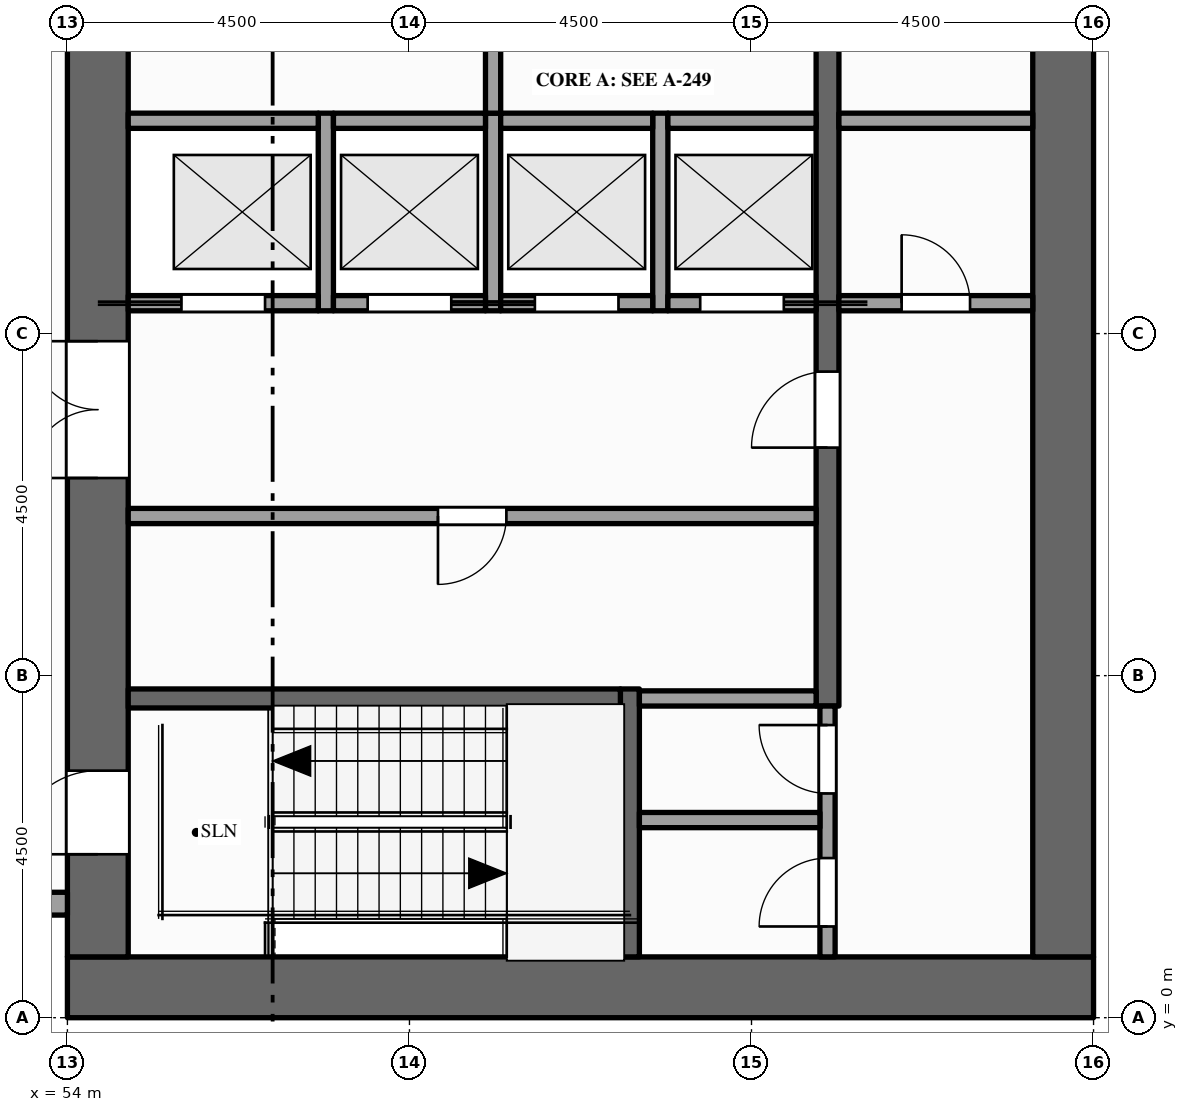
"""IFC4 building model, lengths in metres.
Left out: names, types, materials, properties, quantities, classifications, styles, units other than length and angle.
Written with IfcOpenShell. Run it as: python <this file> out.ifc"""

import sys

from ifc_helpers import new_model, si_unit, direction, frame, frame_2d, origin, place, context, subcontext, project, spatial, rectangle, extrude, element, fill, save


model = new_model("IFC4")
c1 = context("Model", 3, precision=1e-05, world=origin(), true_north=direction((0.0, 1.0)))
c2 = subcontext(c1, "Body", "Model", "MODEL_VIEW")
j1 = project(units=[si_unit("LENGTHUNIT", "METRE"), si_unit("PLANEANGLEUNIT", "RADIAN")], contexts=[c1])
p1 = place(None, origin())
s1 = spatial("IfcSite", under=j1, at=p1, CompositionType="ELEMENT")
p2 = place(p1, origin())
s2 = spatial("IfcBuilding", under=s1, at=p2, CompositionType="ELEMENT")
p3 = place(p2, frame((0.0, 0.0, 281.0)))
s3 = spatial("IfcBuildingStorey", under=s2, at=p3, CompositionType="ELEMENT", Elevation=281.0)
p4 = place(p3, frame((67.5, 0.4, -0.15), z_axis=(0.0, 0.0, 1.0), x_axis=(-1.0, 0.0, 0.0)))
e1 = element("IfcWall", 1, at=p4, inside=s3, PredefinedType="SHEAR", context=c2, shape_type="SweptSolid", body=[
    extrude(rectangle(XDim=13.5, YDim=0.8, at=frame_2d((6.75, 0.0))), origin(), (0.0, 0.0, 1.0), 4.0),
])
p5 = place(p3, frame((54.4, 0.8, -0.15), z_axis=(0.0, 0.0, 1.0), x_axis=(0.0, 1.0, 0.0)))
e2 = element("IfcWall", 2, at=p5, inside=s3, PredefinedType="SHEAR", context=c2, shape_type="SweptSolid", body=[
    extrude(rectangle(XDim=20.9, YDim=0.8, at=frame_2d((10.45, 0.0))), origin(), (0.0, 0.0, 1.0), 4.0),
])
p6 = place(p5, frame((6.3, 0.0, 0.15)))
e3 = element("IfcOpeningElement", 3, at=p6, cuts=e2, PredefinedType="OPENING", context=c2, shape_type="SweptSolid", body=[
    extrude(rectangle(XDim=1.8, YDim=2.1, at=frame_2d((0.9, 1.05))), frame((0.0, 0.41, 0.0), z_axis=(0.0, -1.0, 0.0), x_axis=(1.0, 0.0, 0.0)), (0.0, 0.0, 1.0), 0.82),
])
p7 = place(p5, frame((12.35, 0.0, 0.15)))
e4 = element("IfcOpeningElement", 4, at=p7, cuts=e2, PredefinedType="OPENING", context=c2, shape_type="SweptSolid", body=[
    extrude(rectangle(XDim=1.1, YDim=2.1, at=frame_2d((0.55, 1.05))), frame((0.0, 0.41, 0.0), z_axis=(0.0, -1.0, 0.0), x_axis=(1.0, 0.0, 0.0)), (0.0, 0.0, 1.0), 0.82),
])
p8 = place(p5, frame((1.35, 0.0, 0.15)))
e5 = element("IfcOpeningElement", 5, at=p8, cuts=e2, PredefinedType="OPENING", context=c2, shape_type="SweptSolid", body=[
    extrude(rectangle(XDim=1.1, YDim=2.1, at=frame_2d((0.55, 1.05))), frame((0.0, 0.41, 0.0), z_axis=(0.0, -1.0, 0.0), x_axis=(1.0, 0.0, 0.0)), (0.0, 0.0, 1.0), 0.82),
])
p9 = place(p5, frame((18.55, 0.0, 0.15)))
e6 = element("IfcOpeningElement", 6, at=p9, cuts=e2, PredefinedType="OPENING", context=c2, shape_type="SweptSolid", body=[
    extrude(rectangle(XDim=1.1, YDim=2.1, at=frame_2d((0.55, 1.05))), frame((0.0, 0.41, 0.0), z_axis=(0.0, -1.0, 0.0), x_axis=(1.0, 0.0, 0.0)), (0.0, 0.0, 1.0), 0.82),
])
p10 = place(p3, frame((67.1, 0.8, -0.15), z_axis=(0.0, 0.0, 1.0), x_axis=(0.0, 1.0, 0.0)))
e7 = element("IfcWall", 7, at=p10, inside=s3, PredefinedType="SHEAR", context=c2, shape_type="SweptSolid", body=[
    extrude(rectangle(XDim=20.9, YDim=0.8, at=frame_2d((10.45, 0.0))), origin(), (0.0, 0.0, 1.0), 4.0),
])
p11 = place(p3, frame((49.825, 1.5, 0.0), z_axis=(0.0, 0.0, 1.0), x_axis=(1.0, 0.0, 0.0)))
e8 = element("IfcWall", 8, at=p11, inside=s3, PredefinedType="STANDARD", context=c2, shape_type="SweptSolid", body=[
    extrude(rectangle(XDim=4.175, YDim=0.3, at=frame_2d((2.087, 0.0))), origin(), (0.0, 0.0, 1.0), 2.87),
])
p12 = place(p11, frame((0.413, 0.0, 0.9)))
e9 = element("IfcOpeningElement", 9, at=p12, cuts=e8, PredefinedType="OPENING", context=c2, shape_type="SweptSolid", body=[
    extrude(rectangle(XDim=1.2, YDim=1.75, at=frame_2d((0.6, 0.875))), frame((0.0, 0.16, 0.0), z_axis=(0.0, -1.0, 0.0), x_axis=(1.0, 0.0, 0.0)), (0.0, 0.0, 1.0), 0.32),
])
p13 = place(p11, frame((2.225, 0.0, 0.9)))
e10 = element("IfcOpeningElement", 10, at=p13, cuts=e8, PredefinedType="OPENING", context=c2, shape_type="SweptSolid", body=[
    extrude(rectangle(XDim=1.55, YDim=1.75, at=frame_2d((0.775, 0.875))), frame((0.0, 0.16, 0.0), z_axis=(0.0, -1.0, 0.0), x_axis=(1.0, 0.0, 0.0)), (0.0, 0.0, 1.0), 0.32),
])
for number, where, z_axis, x_axis in (
    (11, (57.4, 9.3, 0.0), (0.0, 0.0, 1.0), (0.0, 1.0, 0.0)),
    (12, (59.6, 9.3, 0.0), (0.0, 0.0, 1.0), (0.0, 1.0, 0.0)),
):
    element("IfcWall", number, at=place(p3, frame(where, z_axis=z_axis, x_axis=x_axis)), inside=s3, PredefinedType="SOLIDWALL", context=c2, shape_type="SweptSolid", body=[
        extrude(rectangle(XDim=2.6, YDim=0.2, at=frame_2d((1.3, 0.0))), origin(), (0.0, 0.0, 1.0), 3.85),
    ])
p14 = place(p3, frame((59.6, 11.9, 0.0), z_axis=(0.0, 0.0, 1.0), x_axis=(0.0, 1.0, 0.0)))
e13 = element("IfcWall", 13, at=p14, inside=s3, PredefinedType="PARTITIONING", context=c2, shape_type="SweptSolid", body=[
    extrude(rectangle(XDim=3.6, YDim=0.2, at=frame_2d((1.8, 0.0))), origin(), (0.0, 0.0, 1.0), 3.85),
])
p15 = place(p14, frame((1.3, 0.0, 0.0)))
e14 = element("IfcOpeningElement", 14, at=p15, cuts=e13, PredefinedType="OPENING", context=c2, shape_type="SweptSolid", body=[
    extrude(rectangle(XDim=1.0, YDim=2.1, at=frame_2d((0.5, 1.05))), frame((0.0, 0.11, 0.0), z_axis=(0.0, -1.0, 0.0), x_axis=(1.0, 0.0, 0.0)), (0.0, 0.0, 1.0), 0.22),
])
p16 = place(p3, frame((61.4, 0.8, 0.0), z_axis=(0.0, 0.0, 1.0), x_axis=(0.0, 1.0, 0.0)))
e15 = element("IfcWall", 15, at=p16, inside=s3, PredefinedType="SHEAR", context=c2, shape_type="SweptSolid", body=[
    extrude(rectangle(XDim=3.525, YDim=0.25, at=frame_2d((1.762, 0.0))), origin(), (0.0, 0.0, 1.0), 3.85),
])
p17 = place(p3, frame((61.8, 9.3, 0.0), z_axis=(0.0, 0.0, 1.0), x_axis=(0.0, 1.0, 0.0)))
e16 = element("IfcWall", 16, at=p17, inside=s3, PredefinedType="SOLIDWALL", context=c2, shape_type="SweptSolid", body=[
    extrude(rectangle(XDim=2.6, YDim=0.2, at=frame_2d((1.3, 0.0))), origin(), (0.0, 0.0, 1.0), 3.85),
])
p18 = place(p3, frame((64.0, 0.8, 0.0), z_axis=(0.0, 0.0, 1.0), x_axis=(0.0, 1.0, 0.0)))
e17 = element("IfcWall", 17, at=p18, inside=s3, PredefinedType="PARTITIONING", context=c2, shape_type="SweptSolid", body=[
    extrude(rectangle(XDim=3.3, YDim=0.2, at=frame_2d((1.65, 0.0))), origin(), (0.0, 0.0, 1.0), 3.85),
])
p19 = place(p18, frame((0.4, 0.0, 0.0)))
e18 = element("IfcOpeningElement", 18, at=p19, cuts=e17, PredefinedType="OPENING", context=c2, shape_type="SweptSolid", body=[
    extrude(rectangle(XDim=0.9, YDim=2.1, at=frame_2d((0.45, 1.05))), frame((0.0, 0.11, 0.0), z_axis=(0.0, -1.0, 0.0), x_axis=(1.0, 0.0, 0.0)), (0.0, 0.0, 1.0), 0.22),
])
p20 = place(p18, frame((2.15, 0.0, 0.0)))
e19 = element("IfcOpeningElement", 19, at=p20, cuts=e17, PredefinedType="OPENING", context=c2, shape_type="SweptSolid", body=[
    extrude(rectangle(XDim=0.9, YDim=2.1, at=frame_2d((0.45, 1.05))), frame((0.0, 0.11, 0.0), z_axis=(0.0, -1.0, 0.0), x_axis=(1.0, 0.0, 0.0)), (0.0, 0.0, 1.0), 0.22),
])
p21 = place(p3, frame((64.0, 4.1, 0.0), z_axis=(0.0, 0.0, 1.0), x_axis=(0.0, 1.0, 0.0)))
e20 = element("IfcWall", 20, at=p21, inside=s3, PredefinedType="SHEAR", context=c2, shape_type="SweptSolid", body=[
    extrude(rectangle(XDim=14.5, YDim=0.3, at=frame_2d((7.25, 0.0))), origin(), (0.0, 0.0, 1.0), 3.85),
])
p22 = place(p21, frame((3.4, 0.0, 0.0)))
e21 = element("IfcOpeningElement", 21, at=p22, cuts=e20, PredefinedType="OPENING", context=c2, shape_type="SweptSolid", body=[
    extrude(rectangle(XDim=1.0, YDim=2.1, at=frame_2d((0.5, 1.05))), frame((0.0, 0.16, 0.0), z_axis=(0.0, -1.0, 0.0), x_axis=(1.0, 0.0, 0.0)), (0.0, 0.0, 1.0), 0.32),
])
p23 = place(p21, frame((9.1, 0.0, 0.0)))
e22 = element("IfcOpeningElement", 22, at=p23, cuts=e20, PredefinedType="OPENING", context=c2, shape_type="SweptSolid", body=[
    extrude(rectangle(XDim=1.0, YDim=2.1, at=frame_2d((0.5, 1.05))), frame((0.0, 0.16, 0.0), z_axis=(0.0, -1.0, 0.0), x_axis=(1.0, 0.0, 0.0)), (0.0, 0.0, 1.0), 0.32),
])
p24 = place(p3, frame((61.525, 2.6, 0.0), z_axis=(0.0, 0.0, 1.0), x_axis=(1.0, 0.0, 0.0)))
e23 = element("IfcWall", 23, at=p24, inside=s3, PredefinedType="PARTITIONING", context=c2, shape_type="SweptSolid", body=[
    extrude(rectangle(XDim=2.375, YDim=0.2, at=frame_2d((1.188, 0.0))), origin(), (0.0, 0.0, 1.0), 3.85),
])
p25 = place(p3, frame((54.8, 4.2, 0.0), z_axis=(0.0, 0.0, 1.0), x_axis=(1.0, 0.0, 0.0)))
e24 = element("IfcWall", 24, at=p25, inside=s3, PredefinedType="SHEAR", context=c2, shape_type="SweptSolid", body=[
    extrude(rectangle(XDim=6.475, YDim=0.25, at=frame_2d((3.237, 0.0))), origin(), (0.0, 0.0, 1.0), 3.85),
])
p26 = place(p3, frame((61.525, 4.2, 0.0), z_axis=(0.0, 0.0, 1.0), x_axis=(1.0, 0.0, 0.0)))
e25 = element("IfcWall", 25, at=p26, inside=s3, PredefinedType="PARTITIONING", context=c2, shape_type="SweptSolid", body=[
    extrude(rectangle(XDim=2.325, YDim=0.2, at=frame_2d((1.163, 0.0))), origin(), (0.0, 0.0, 1.0), 3.85),
])
p27 = place(p3, frame((54.8, 6.6, 0.0), z_axis=(0.0, 0.0, 1.0), x_axis=(1.0, 0.0, 0.0)))
e26 = element("IfcWall", 26, at=p27, inside=s3, PredefinedType="PARTITIONING", context=c2, shape_type="SweptSolid", body=[
    extrude(rectangle(XDim=9.05, YDim=0.2, at=frame_2d((4.525, 0.0))), origin(), (0.0, 0.0, 1.0), 3.85),
])
p28 = place(p27, frame((4.075, 0.0, 0.0)))
e27 = element("IfcOpeningElement", 27, at=p28, cuts=e26, PredefinedType="OPENING", context=c2, shape_type="SweptSolid", body=[
    extrude(rectangle(XDim=0.9, YDim=2.1, at=frame_2d((0.45, 1.05))), frame((0.0, 0.11, 0.0), z_axis=(0.0, -1.0, 0.0), x_axis=(1.0, 0.0, 0.0)), (0.0, 0.0, 1.0), 0.22),
])
p29 = place(p3, frame((54.8, 9.4, 0.0), z_axis=(0.0, 0.0, 1.0), x_axis=(1.0, 0.0, 0.0)))
e28 = element("IfcWall", 28, at=p29, inside=s3, PredefinedType="SOLIDWALL", context=c2, shape_type="SweptSolid", body=[
    extrude(rectangle(XDim=2.5, YDim=0.2, at=frame_2d((1.25, 0.0))), origin(), (0.0, 0.0, 1.0), 3.85),
])
p30 = place(p29, frame((0.7, 0.0, 0.012)))
e29 = element("IfcOpeningElement", 29, at=p30, cuts=e28, PredefinedType="OPENING", context=c2, shape_type="SweptSolid", body=[
    extrude(rectangle(XDim=1.1, YDim=2.1, at=frame_2d((0.55, 1.05))), frame((0.0, 0.11, 0.0), z_axis=(0.0, -1.0, 0.0), x_axis=(1.0, 0.0, 0.0)), (0.0, 0.0, 1.0), 0.22),
])
p31 = place(p3, frame((57.5, 9.4, 0.0), z_axis=(0.0, 0.0, 1.0), x_axis=(1.0, 0.0, 0.0)))
e30 = element("IfcWall", 30, at=p31, inside=s3, PredefinedType="SOLIDWALL", context=c2, shape_type="SweptSolid", body=[
    extrude(rectangle(XDim=2.0, YDim=0.2, at=frame_2d((1.0, 0.0))), origin(), (0.0, 0.0, 1.0), 3.85),
])
p32 = place(p31, frame((0.45, 0.0, 0.012)))
e31 = element("IfcOpeningElement", 31, at=p32, cuts=e30, PredefinedType="OPENING", context=c2, shape_type="SweptSolid", body=[
    extrude(rectangle(XDim=1.1, YDim=2.1, at=frame_2d((0.55, 1.05))), frame((0.0, 0.11, 0.0), z_axis=(0.0, -1.0, 0.0), x_axis=(1.0, 0.0, 0.0)), (0.0, 0.0, 1.0), 0.22),
])
p33 = place(p3, frame((59.7, 9.4, 0.0), z_axis=(0.0, 0.0, 1.0), x_axis=(1.0, 0.0, 0.0)))
e32 = element("IfcWall", 32, at=p33, inside=s3, PredefinedType="SOLIDWALL", context=c2, shape_type="SweptSolid", body=[
    extrude(rectangle(XDim=2.0, YDim=0.2, at=frame_2d((1.0, 0.0))), origin(), (0.0, 0.0, 1.0), 3.85),
])
p34 = place(p33, frame((0.45, 0.0, 0.012)))
e33 = element("IfcOpeningElement", 33, at=p34, cuts=e32, PredefinedType="OPENING", context=c2, shape_type="SweptSolid", body=[
    extrude(rectangle(XDim=1.1, YDim=2.1, at=frame_2d((0.55, 1.05))), frame((0.0, 0.11, 0.0), z_axis=(0.0, -1.0, 0.0), x_axis=(1.0, 0.0, 0.0)), (0.0, 0.0, 1.0), 0.22),
])
p35 = place(p3, frame((61.9, 9.4, 0.0), z_axis=(0.0, 0.0, 1.0), x_axis=(1.0, 0.0, 0.0)))
e34 = element("IfcWall", 34, at=p35, inside=s3, PredefinedType="SOLIDWALL", context=c2, shape_type="SweptSolid", body=[
    extrude(rectangle(XDim=1.95, YDim=0.2, at=frame_2d((0.975, 0.0))), origin(), (0.0, 0.0, 1.0), 3.85),
])
p36 = place(p35, frame((0.425, 0.0, 0.012)))
e35 = element("IfcOpeningElement", 35, at=p36, cuts=e34, PredefinedType="OPENING", context=c2, shape_type="SweptSolid", body=[
    extrude(rectangle(XDim=1.1, YDim=2.1, at=frame_2d((0.55, 1.05))), frame((0.0, 0.11, 0.0), z_axis=(0.0, -1.0, 0.0), x_axis=(1.0, 0.0, 0.0)), (0.0, 0.0, 1.0), 0.22),
])
p37 = place(p3, frame((64.15, 9.4, 0.0), z_axis=(0.0, 0.0, 1.0), x_axis=(1.0, 0.0, 0.0)))
e36 = element("IfcWall", 36, at=p37, inside=s3, PredefinedType="PARTITIONING", context=c2, shape_type="SweptSolid", body=[
    extrude(rectangle(XDim=2.55, YDim=0.2, at=frame_2d((1.275, 0.0))), origin(), (0.0, 0.0, 1.0), 3.85),
])
p38 = place(p37, frame((0.825, 0.0, 0.0)))
e37 = element("IfcOpeningElement", 37, at=p38, cuts=e36, PredefinedType="OPENING", context=c2, shape_type="SweptSolid", body=[
    extrude(rectangle(XDim=0.9, YDim=2.1, at=frame_2d((0.45, 1.05))), frame((0.0, 0.11, 0.0), z_axis=(0.0, -1.0, 0.0), x_axis=(1.0, 0.0, 0.0)), (0.0, 0.0, 1.0), 0.22),
])
p39 = place(p3, frame((54.8, 11.8, 0.0), z_axis=(0.0, 0.0, 1.0), x_axis=(1.0, 0.0, 0.0)))
e38 = element("IfcWall", 38, at=p39, inside=s3, PredefinedType="SOLIDWALL", context=c2, shape_type="SweptSolid", body=[
    extrude(rectangle(XDim=2.5, YDim=0.2, at=frame_2d((1.25, 0.0))), origin(), (0.0, 0.0, 1.0), 3.85),
])
for number, where, z_axis, x_axis in (
    (39, (57.5, 11.8, 0.0), (0.0, 0.0, 1.0), (1.0, 0.0, 0.0)),
    (40, (59.7, 11.8, 0.0), (0.0, 0.0, 1.0), (1.0, 0.0, 0.0)),
):
    element("IfcWall", number, at=place(p3, frame(where, z_axis=z_axis, x_axis=x_axis)), inside=s3, PredefinedType="SOLIDWALL", context=c2, shape_type="SweptSolid", body=[
        extrude(rectangle(XDim=2.0, YDim=0.2, at=frame_2d((1.0, 0.0))), origin(), (0.0, 0.0, 1.0), 3.85),
    ])
p40 = place(p3, frame((61.9, 11.8, 0.0), z_axis=(0.0, 0.0, 1.0), x_axis=(1.0, 0.0, 0.0)))
e41 = element("IfcWall", 41, at=p40, inside=s3, PredefinedType="SOLIDWALL", context=c2, shape_type="SweptSolid", body=[
    extrude(rectangle(XDim=1.95, YDim=0.2, at=frame_2d((0.975, 0.0))), origin(), (0.0, 0.0, 1.0), 3.85),
])
p41 = place(p3, frame((64.15, 11.8, 0.0), z_axis=(0.0, 0.0, 1.0), x_axis=(1.0, 0.0, 0.0)))
e42 = element("IfcWall", 42, at=p41, inside=s3, PredefinedType="PARTITIONING", context=c2, shape_type="SweptSolid", body=[
    extrude(rectangle(XDim=2.55, YDim=0.2, at=frame_2d((1.275, 0.0))), origin(), (0.0, 0.0, 1.0), 3.85),
])
p42 = place(p30, origin())
e43 = element("IfcDoor", 43, at=p42, inside=s3, OperationType="SLIDING_TO_LEFT", PredefinedType="DOOR", context=c2, shape_type="SweptSolid", body=[
    extrude(rectangle(XDim=1.1, YDim=2.1, at=frame_2d((0.55, 1.05))), frame((0.0, 0.025, 0.0), z_axis=(0.0, -1.0, 0.0), x_axis=(1.0, 0.0, 0.0)), (0.0, 0.0, 1.0), 0.05),
])
fill(e29, e43)
p43 = place(p32, origin())
e44 = element("IfcDoor", 44, at=p43, inside=s3, OperationType="SLIDING_TO_RIGHT", PredefinedType="DOOR", context=c2, shape_type="SweptSolid", body=[
    extrude(rectangle(XDim=1.1, YDim=2.1, at=frame_2d((0.55, 1.05))), frame((0.0, 0.025, 0.0), z_axis=(0.0, -1.0, 0.0), x_axis=(1.0, 0.0, 0.0)), (0.0, 0.0, 1.0), 0.05),
])
fill(e31, e44)
p44 = place(p34, origin())
e45 = element("IfcDoor", 45, at=p44, inside=s3, OperationType="SLIDING_TO_LEFT", PredefinedType="DOOR", context=c2, shape_type="SweptSolid", body=[
    extrude(rectangle(XDim=1.1, YDim=2.1, at=frame_2d((0.55, 1.05))), frame((0.0, 0.025, 0.0), z_axis=(0.0, -1.0, 0.0), x_axis=(1.0, 0.0, 0.0)), (0.0, 0.0, 1.0), 0.05),
])
fill(e33, e45)
p45 = place(p36, origin())
e46 = element("IfcDoor", 46, at=p45, inside=s3, OperationType="SLIDING_TO_RIGHT", PredefinedType="DOOR", context=c2, shape_type="SweptSolid", body=[
    extrude(rectangle(XDim=1.1, YDim=2.1, at=frame_2d((0.55, 1.05))), frame((0.0, 0.025, 0.0), z_axis=(0.0, -1.0, 0.0), x_axis=(1.0, 0.0, 0.0)), (0.0, 0.0, 1.0), 0.05),
])
fill(e35, e46)
p46 = place(p6, origin())
e47 = element("IfcDoor", 47, at=p46, inside=s3, OperationType="DOUBLE_DOOR_SINGLE_SWING", PredefinedType="DOOR", context=c2, shape_type="SweptSolid", body=[
    extrude(rectangle(XDim=1.8, YDim=2.1, at=frame_2d((0.9, 1.05))), frame((0.0, 0.025, 0.0), z_axis=(0.0, -1.0, 0.0), x_axis=(1.0, 0.0, 0.0)), (0.0, 0.0, 1.0), 0.05),
])
fill(e3, e47)
p47 = place(p22, origin())
e48 = element("IfcDoor", 48, at=p47, inside=s3, OperationType="SINGLE_SWING_LEFT", PredefinedType="DOOR", context=c2, shape_type="SweptSolid", body=[
    extrude(rectangle(XDim=1.0, YDim=2.1, at=frame_2d((0.5, 1.05))), frame((0.0, 0.025, 0.0), z_axis=(0.0, -1.0, 0.0), x_axis=(1.0, 0.0, 0.0)), (0.0, 0.0, 1.0), 0.05),
])
fill(e21, e48)
p48 = place(p38, origin())
e49 = element("IfcDoor", 49, at=p48, inside=s3, OperationType="SINGLE_SWING_LEFT", PredefinedType="DOOR", context=c2, shape_type="SweptSolid", body=[
    extrude(rectangle(XDim=0.9, YDim=2.1, at=frame_2d((0.45, 1.05))), frame((0.0, 0.025, 0.0), z_axis=(0.0, -1.0, 0.0), x_axis=(1.0, 0.0, 0.0)), (0.0, 0.0, 1.0), 0.05),
])
fill(e37, e49)
p49 = place(p8, origin())
e50 = element("IfcDoor", 50, at=p49, inside=s3, OperationType="SINGLE_SWING_LEFT", PredefinedType="DOOR", context=c2, shape_type="SweptSolid", body=[
    extrude(rectangle(XDim=1.1, YDim=2.1, at=frame_2d((0.55, 1.05))), frame((0.0, 0.025, 0.0), z_axis=(0.0, -1.0, 0.0), x_axis=(1.0, 0.0, 0.0)), (0.0, 0.0, 1.0), 0.05),
])
fill(e5, e50)
p50 = place(p19, origin())
e51 = element("IfcDoor", 51, at=p50, inside=s3, OperationType="SINGLE_SWING_LEFT", PredefinedType="DOOR", context=c2, shape_type="SweptSolid", body=[
    extrude(rectangle(XDim=0.9, YDim=2.1, at=frame_2d((0.45, 1.05))), frame((0.0, 0.025, 0.0), z_axis=(0.0, -1.0, 0.0), x_axis=(1.0, 0.0, 0.0)), (0.0, 0.0, 1.0), 0.05),
])
fill(e18, e51)
p51 = place(p20, origin())
e52 = element("IfcDoor", 52, at=p51, inside=s3, OperationType="SINGLE_SWING_RIGHT", PredefinedType="DOOR", context=c2, shape_type="SweptSolid", body=[
    extrude(rectangle(XDim=0.9, YDim=2.1, at=frame_2d((0.45, 1.05))), frame((0.0, 0.025, 0.0), z_axis=(0.0, -1.0, 0.0), x_axis=(1.0, 0.0, 0.0)), (0.0, 0.0, 1.0), 0.05),
])
fill(e19, e52)
p52 = place(p28, origin())
e53 = element("IfcDoor", 53, at=p52, inside=s3, OperationType="SINGLE_SWING_LEFT", PredefinedType="DOOR", context=c2, shape_type="SweptSolid", body=[
    extrude(rectangle(XDim=0.9, YDim=2.1, at=frame_2d((0.45, 1.05))), frame((0.0, 0.025, 0.0), z_axis=(0.0, -1.0, 0.0), x_axis=(1.0, 0.0, 0.0)), (0.0, 0.0, 1.0), 0.05),
])
fill(e27, e53)
save(model, sys.argv[1])
